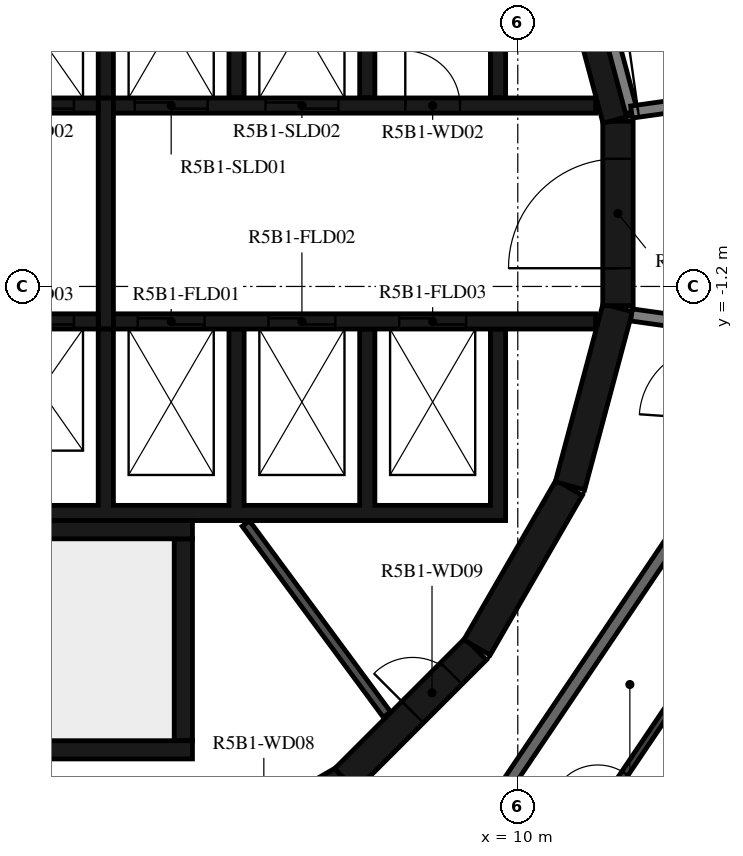
"""IFC4 building model, lengths in metres.
Left out: names, types, materials, properties, quantities, classifications, styles, units other than length and angle.
Written with IfcOpenShell. Run it as: python <this file> out.ifc"""

import sys

from ifc_helpers import new_model, si_unit, direction, frame, frame_2d, origin, place, context, subcontext, project, spatial, polyline, rectangle, outline, extrude, element, fill, save


model = new_model("IFC4")
c1 = context("Model", 3, precision=1e-05, world=origin(), true_north=direction((0.0, 1.0)))
c2 = subcontext(c1, "Body", "Model", "MODEL_VIEW")
j1 = project(units=[si_unit("LENGTHUNIT", "METRE"), si_unit("PLANEANGLEUNIT", "RADIAN")], contexts=[c1])
p1 = place(None, origin())
s1 = spatial("IfcSite", under=j1, at=p1, CompositionType="ELEMENT")
p2 = place(p1, origin())
s2 = spatial("IfcBuilding", under=s1, at=p2, CompositionType="ELEMENT")
p3 = place(p2, frame((0.0, 0.0, 198.9)))
s3 = spatial("IfcBuildingStorey", under=s2, at=p3, CompositionType="ELEMENT", Elevation=198.9)
p4 = place(p3, frame((4.51, -10.845, 0.0), z_axis=(0.0, 0.0, 1.0), x_axis=(0.865975092491, 0.500087131594, 0.0)))
e1 = element("IfcWall", 1, at=p4, inside=s3, PredefinedType="SHEAR", context=c2, shape_type="SweptSolid", body=[
    extrude(rectangle(XDim=3.033, YDim=0.5, at=frame_2d((1.516, 0.0))), origin(), (0.0, 0.0, 1.0), 3.12),
])
p5 = place(p4, frame((1.066, 0.0, 0.0)))
e2 = element("IfcOpeningElement", 2, at=p5, cuts=e1, PredefinedType="OPENING", context=c2, shape_type="SweptSolid", body=[
    extrude(rectangle(XDim=0.9, YDim=2.1, at=frame_2d((0.45, 1.05))), frame((0.0, 0.26, 0.0), z_axis=(0.0, -1.0, 0.0), x_axis=(1.0, 0.0, 0.0)), (0.0, 0.0, 1.0), 0.52),
])
p6 = place(p3, frame((7.164, -9.308, 0.0), z_axis=(0.0, 0.0, 1.0), x_axis=(0.707106781187, 0.707106781187, 0.0)))
e3 = element("IfcWall", 3, at=p6, inside=s3, PredefinedType="SHEAR", context=c2, shape_type="SweptSolid", body=[
    extrude(rectangle(XDim=3.032, YDim=0.5, at=frame_2d((1.516, 0.0))), origin(), (0.0, 0.0, 1.0), 3.12),
])
p7 = place(p6, frame((1.566, 0.0, 0.0)))
e4 = element("IfcOpeningElement", 4, at=p7, cuts=e3, PredefinedType="OPENING", context=c2, shape_type="SweptSolid", body=[
    extrude(rectangle(XDim=0.9, YDim=2.1, at=frame_2d((0.45, 1.05))), frame((0.0, 0.26, 0.0), z_axis=(0.0, -1.0, 0.0), x_axis=(1.0, 0.0, 0.0)), (0.0, 0.0, 1.0), 0.52),
])
for number, where, z_axis, x_axis in (
    (5, (9.329, -7.137, 0.0), (0.0, 0.0, 1.0), (0.5, 0.866, 0.0)),
    (6, (10.858, -4.479, 0.0), (0.0, 0.0, 1.0), (0.259, 0.966, 0.0)),
):
    element("IfcWall", number, at=place(p3, frame(where, z_axis=z_axis, x_axis=x_axis)), inside=s3, PredefinedType="SHEAR", context=c2, shape_type="SweptSolid", body=[
        extrude(rectangle(XDim=3.033, YDim=0.5, at=frame_2d((1.516, 0.0))), origin(), (0.0, 0.0, 1.0), 3.12),
    ])
p8 = place(p3, frame((11.647, -1.516, 0.0), z_axis=(0.0, 0.0, 1.0), x_axis=(0.0, 1.0, 0.0)))
e7 = element("IfcWall", 7, at=p8, inside=s3, PredefinedType="SHEAR", context=c2, shape_type="SweptSolid", body=[
    extrude(rectangle(XDim=3.033, YDim=0.5, at=frame_2d((1.516, 0.0))), origin(), (0.0, 0.0, 1.0), 3.12),
])
p9 = place(p8, frame((0.616, 0.0, 0.0)))
e8 = element("IfcOpeningElement", 8, at=p9, cuts=e7, PredefinedType="OPENING", context=c2, shape_type="SweptSolid", body=[
    extrude(rectangle(XDim=1.8, YDim=2.1, at=frame_2d((0.9, 1.05))), frame((0.0, 0.26, 0.0), z_axis=(0.0, -1.0, 0.0), x_axis=(1.0, 0.0, 0.0)), (0.0, 0.0, 1.0), 0.52),
])
p10 = place(p3, frame((11.643, 1.55, 0.0), z_axis=(0.0, 0.0, 1.0), x_axis=(-0.258734743916, 0.965948410781, 0.0)))
e9 = element("IfcWall", 9, at=p10, inside=s3, PredefinedType="SHEAR", context=c2, shape_type="SweptSolid", body=[
    extrude(rectangle(XDim=3.033, YDim=0.5, at=frame_2d((1.516, 0.0))), origin(), (0.0, 0.0, 1.0), 3.12),
])
p11 = place(p3, frame((-2.4, -5.2, 0.0), z_axis=(0.0, 0.0, 1.0), x_axis=(1.0, 0.0, 0.0)))
e10 = element("IfcWall", 10, at=p11, inside=s3, PredefinedType="SHEAR", context=c2, shape_type="SweptSolid", body=[
    extrude(rectangle(XDim=7.05, YDim=0.3, at=frame_2d((3.525, 0.0))), origin(), (0.0, 0.0, 1.0), 3.12),
])
p12 = place(p3, frame((4.5, -8.67, 0.0), z_axis=(0.0, 0.0, 1.0), x_axis=(0.0, 1.0, 0.0)))
e11 = element("IfcWall", 11, at=p12, inside=s3, PredefinedType="SHEAR", context=c2, shape_type="SweptSolid", body=[
    extrude(rectangle(XDim=3.32, YDim=0.3, at=frame_2d((1.66, 0.0))), origin(), (0.0, 0.0, 1.0), 3.12),
])
p13 = place(p3, frame((0.1, -8.82, 0.0), z_axis=(0.0, 0.0, 1.0), x_axis=(1.0, 0.0, 0.0)))
e12 = element("IfcWall", 12, at=p13, inside=s3, PredefinedType="SHEAR", context=c2, shape_type="SweptSolid", body=[
    extrude(rectangle(XDim=4.55, YDim=0.3, at=frame_2d((2.275, 0.0))), origin(), (0.0, 0.0, 1.0), 3.12),
])
p14 = place(p3, origin())
e13 = element("IfcWall", 13, at=p14, inside=s3, PredefinedType="SHEAR", context=c2, shape_type="SweptSolid", body=[
    extrude(outline(polyline([(-9.55, 4.8), (-1.2, 4.8), (-1.2, 1.9), (-0.95, 1.9), (-0.95, 4.8), (0.95, 4.8), (0.95, 1.9), (1.2, 1.9), (1.2, 4.8), (3.1, 4.8), (3.1, 1.9), (3.35, 1.9), (3.35, 4.8), (5.25, 4.8), (5.25, 1.9), (5.5, 1.9), (5.5, 4.8), (7.4, 4.8), (7.4, 1.9), (7.65, 1.9), (7.65, 4.8), (9.55, 4.8), (9.55, 1.9), (9.8, 1.9), (9.8, 4.8), (9.8, 5.05), (-9.8, 5.05), (-9.8, 4.8), (-9.8, 1.9), (-9.55, 1.9), (-9.55, 4.8)])), origin(), (0.0, 0.0, 1.0), 3.12),
])
p15 = place(p3, origin())
e14 = element("IfcWall", 14, at=p15, inside=s3, PredefinedType="SHEAR", context=c2, shape_type="SweptSolid", body=[
    extrude(outline(polyline([(9.8, -5.05), (9.8, -4.8), (9.8, -1.9), (9.55, -1.9), (9.55, -4.8), (7.65, -4.8), (7.65, -1.9), (7.4, -1.9), (7.4, -4.8), (5.5, -4.8), (5.5, -1.9), (5.25, -1.9), (5.25, -4.8), (3.35, -4.8), (3.35, -1.9), (3.1, -1.9), (3.1, -4.8), (1.2, -4.8), (1.2, -1.9), (0.95, -1.9), (0.95, -4.8), (-0.95, -4.8), (-0.95, -1.9), (-1.2, -1.9), (-1.2, -4.8), (-3.1, -4.8), (-3.1, -1.9), (-3.35, -1.9), (-3.35, -4.8), (-5.25, -4.8), (-5.25, -1.9), (-5.5, -1.9), (-5.5, -4.8), (-7.4, -4.8), (-7.4, -1.9), (-7.65, -1.9), (-7.65, -4.8), (-9.55, -4.8), (-9.55, -1.9), (-9.8, -1.9), (-9.8, -4.8), (-9.8, -5.05), (9.8, -5.05)])), origin(), (0.0, 0.0, 1.0), 3.12),
])
p16 = place(p3, frame((-11.28, 1.775, 0.0), z_axis=(0.0, 0.0, 1.0), x_axis=(1.0, 0.0, 0.0)))
e15 = element("IfcWall", 15, at=p16, inside=s3, PredefinedType="SHEAR", context=c2, shape_type="SweptSolid", body=[
    extrude(rectangle(XDim=14.38, YDim=0.25, at=frame_2d((7.19, 0.0))), origin(), (0.0, 0.0, 1.0), 3.12),
])
p17 = place(p16, frame((10.73, 0.0, 0.0)))
e16 = element("IfcOpeningElement", 16, at=p17, cuts=e15, PredefinedType="OPENING", context=c2, shape_type="SweptSolid", body=[
    extrude(rectangle(XDim=1.1, YDim=2.1, at=frame_2d((0.55, 1.05))), frame((0.0, 0.135, 0.0), z_axis=(0.0, -1.0, 0.0), x_axis=(1.0, 0.0, 0.0)), (0.0, 0.0, 1.0), 0.27),
])
p18 = place(p16, frame((12.88, 0.0, 0.0)))
e17 = element("IfcOpeningElement", 17, at=p18, cuts=e15, PredefinedType="OPENING", context=c2, shape_type="SweptSolid", body=[
    extrude(rectangle(XDim=1.1, YDim=2.1, at=frame_2d((0.55, 1.05))), frame((0.0, 0.135, 0.0), z_axis=(0.0, -1.0, 0.0), x_axis=(1.0, 0.0, 0.0)), (0.0, 0.0, 1.0), 0.27),
])
p19 = place(p16, frame((5.455, 0.0, 0.0)))
e18 = element("IfcOpeningElement", 18, at=p19, cuts=e15, PredefinedType="OPENING", context=c2, shape_type="SweptSolid", body=[
    extrude(rectangle(XDim=0.9, YDim=2.1, at=frame_2d((0.45, 1.05))), frame((0.0, 0.135, 0.0), z_axis=(0.0, -1.0, 0.0), x_axis=(1.0, 0.0, 0.0)), (0.0, 0.0, 1.0), 0.27),
])
p20 = place(p3, frame((3.35, 1.775, 0.0), z_axis=(0.0, 0.0, 1.0), x_axis=(1.0, 0.0, 0.0)))
e19 = element("IfcWall", 19, at=p20, inside=s3, PredefinedType="SHEAR", context=c2, shape_type="SweptSolid", body=[
    extrude(rectangle(XDim=7.93, YDim=0.25, at=frame_2d((3.965, 0.0))), origin(), (0.0, 0.0, 1.0), 3.12),
])
p21 = place(p20, frame((0.35, 0.0, 0.0)))
e20 = element("IfcOpeningElement", 20, at=p21, cuts=e19, PredefinedType="OPENING", context=c2, shape_type="SweptSolid", body=[
    extrude(rectangle(XDim=1.2, YDim=2.4, at=frame_2d((0.6, 1.2))), frame((0.0, 0.135, 0.0), z_axis=(0.0, -1.0, 0.0), x_axis=(1.0, 0.0, 0.0)), (0.0, 0.0, 1.0), 0.27),
])
p22 = place(p20, frame((2.5, 0.0, 0.0)))
e21 = element("IfcOpeningElement", 21, at=p22, cuts=e19, PredefinedType="OPENING", context=c2, shape_type="SweptSolid", body=[
    extrude(rectangle(XDim=1.2, YDim=2.4, at=frame_2d((0.6, 1.2))), frame((0.0, 0.135, 0.0), z_axis=(0.0, -1.0, 0.0), x_axis=(1.0, 0.0, 0.0)), (0.0, 0.0, 1.0), 0.27),
])
p23 = place(p20, frame((4.8, 0.0, 0.0)))
e22 = element("IfcOpeningElement", 22, at=p23, cuts=e19, PredefinedType="OPENING", context=c2, shape_type="SweptSolid", body=[
    extrude(rectangle(XDim=0.9, YDim=2.1, at=frame_2d((0.45, 1.05))), frame((0.0, 0.135, 0.0), z_axis=(0.0, -1.0, 0.0), x_axis=(1.0, 0.0, 0.0)), (0.0, 0.0, 1.0), 0.27),
])
p24 = place(p3, frame((-11.28, -1.775, 0.0), z_axis=(0.0, 0.0, 1.0), x_axis=(1.0, 0.0, 0.0)))
e23 = element("IfcWall", 23, at=p24, inside=s3, PredefinedType="SHEAR", context=c2, shape_type="SweptSolid", body=[
    extrude(rectangle(XDim=14.38, YDim=0.25, at=frame_2d((7.19, 0.0))), origin(), (0.0, 0.0, 1.0), 3.12),
])
p25 = place(p24, frame((12.88, 0.0, 0.0)))
e24 = element("IfcOpeningElement", 24, at=p25, cuts=e23, PredefinedType="OPENING", context=c2, shape_type="SweptSolid", body=[
    extrude(rectangle(XDim=1.1, YDim=2.1, at=frame_2d((0.55, 1.05))), frame((0.0, 0.135, 0.0), z_axis=(0.0, -1.0, 0.0), x_axis=(1.0, 0.0, 0.0)), (0.0, 0.0, 1.0), 0.27),
])
p26 = place(p24, frame((6.53, 0.0, 0.0)))
e25 = element("IfcOpeningElement", 25, at=p26, cuts=e23, PredefinedType="OPENING", context=c2, shape_type="SweptSolid", body=[
    extrude(rectangle(XDim=0.9, YDim=2.1, at=frame_2d((0.45, 1.05))), frame((0.0, 0.135, 0.0), z_axis=(0.0, -1.0, 0.0), x_axis=(1.0, 0.0, 0.0)), (0.0, 0.0, 1.0), 0.27),
])
p27 = place(p24, frame((8.68, 0.0, 0.0)))
e26 = element("IfcOpeningElement", 26, at=p27, cuts=e23, PredefinedType="OPENING", context=c2, shape_type="SweptSolid", body=[
    extrude(rectangle(XDim=0.9, YDim=2.1, at=frame_2d((0.45, 1.05))), frame((0.0, 0.135, 0.0), z_axis=(0.0, -1.0, 0.0), x_axis=(1.0, 0.0, 0.0)), (0.0, 0.0, 1.0), 0.27),
])
p28 = place(p24, frame((10.83, 0.0, 0.0)))
e27 = element("IfcOpeningElement", 27, at=p28, cuts=e23, PredefinedType="OPENING", context=c2, shape_type="SweptSolid", body=[
    extrude(rectangle(XDim=0.9, YDim=2.1, at=frame_2d((0.45, 1.05))), frame((0.0, 0.135, 0.0), z_axis=(0.0, -1.0, 0.0), x_axis=(1.0, 0.0, 0.0)), (0.0, 0.0, 1.0), 0.27),
])
p29 = place(p3, frame((3.35, -1.775, 0.0), z_axis=(0.0, 0.0, 1.0), x_axis=(1.0, 0.0, 0.0)))
e28 = element("IfcWall", 28, at=p29, inside=s3, PredefinedType="SHEAR", context=c2, shape_type="SweptSolid", body=[
    extrude(rectangle(XDim=7.93, YDim=0.25, at=frame_2d((3.965, 0.0))), origin(), (0.0, 0.0, 1.0), 3.12),
])
p30 = place(p29, frame((0.4, 0.0, 0.0)))
e29 = element("IfcOpeningElement", 29, at=p30, cuts=e28, PredefinedType="OPENING", context=c2, shape_type="SweptSolid", body=[
    extrude(rectangle(XDim=1.1, YDim=2.4, at=frame_2d((0.55, 1.2))), frame((0.0, 0.135, 0.0), z_axis=(0.0, -1.0, 0.0), x_axis=(1.0, 0.0, 0.0)), (0.0, 0.0, 1.0), 0.27),
])
p31 = place(p29, frame((2.55, 0.0, 0.0)))
e30 = element("IfcOpeningElement", 30, at=p31, cuts=e28, PredefinedType="OPENING", context=c2, shape_type="SweptSolid", body=[
    extrude(rectangle(XDim=1.1, YDim=2.4, at=frame_2d((0.55, 1.2))), frame((0.0, 0.135, 0.0), z_axis=(0.0, -1.0, 0.0), x_axis=(1.0, 0.0, 0.0)), (0.0, 0.0, 1.0), 0.27),
])
p32 = place(p29, frame((4.7, 0.0, 0.0)))
e31 = element("IfcOpeningElement", 31, at=p32, cuts=e28, PredefinedType="OPENING", context=c2, shape_type="SweptSolid", body=[
    extrude(rectangle(XDim=1.1, YDim=2.4, at=frame_2d((0.55, 1.2))), frame((0.0, 0.135, 0.0), z_axis=(0.0, -1.0, 0.0), x_axis=(1.0, 0.0, 0.0)), (0.0, 0.0, 1.0), 0.27),
])
p33 = place(p3, frame((3.225, -1.9, 0.0), z_axis=(0.0, 0.0, 1.0), x_axis=(0.0, 1.0, 0.0)))
e32 = element("IfcWall", 32, at=p33, inside=s3, PredefinedType="SHEAR", context=c2, shape_type="SweptSolid", body=[
    extrude(rectangle(XDim=3.8, YDim=0.25, at=frame_2d((1.9, 0.0))), origin(), (0.0, 0.0, 1.0), 3.12),
])
p34 = place(p3, frame((5.528, -5.098, 0.0), z_axis=(0.0, 0.0, 1.0), x_axis=(0.594034318069, -0.804439698769, 0.0)))
e33 = element("IfcWall", 33, at=p34, inside=s3, PredefinedType="PARTITIONING", context=c2, shape_type="SweptSolid", body=[
    extrude(rectangle(XDim=3.907, YDim=0.15, at=frame_2d((1.953, 0.0))), origin(), (0.0, 0.0, 1.0), 3.12),
])
p35 = place(p3, frame((11.87, 1.668, 0.0), z_axis=(0.0, 0.0, 1.0), x_axis=(-0.258836880648, 0.965921047093, 0.0)))
e34 = element("IfcWall", 34, at=p35, inside=s3, PredefinedType="STANDARD", context=c2, shape_type="SweptSolid", body=[
    extrude(rectangle(XDim=1.695, YDim=0.2, at=frame_2d((0.848, 0.0))), origin(), (0.0, 0.0, 1.0), 3.12),
])
p36 = place(p3, frame((11.87, 1.668, 0.0), z_axis=(0.0, 0.0, 1.0), x_axis=(0.990271931984, 0.139145609792, 0.0)))
e35 = element("IfcWall", 35, at=p36, inside=s3, PredefinedType="STANDARD", context=c2, shape_type="SweptSolid", body=[
    extrude(rectangle(XDim=1.712, YDim=0.2, at=frame_2d((0.856, 0.0))), origin(), (0.0, 0.0, 1.0), 3.12),
])
p37 = place(p36, frame((0.11, 0.0, 0.0)))
e36 = element("IfcOpeningElement", 36, at=p37, cuts=e35, PredefinedType="OPENING", context=c2, shape_type="SweptSolid", body=[
    extrude(rectangle(XDim=1.2, YDim=2.1, at=frame_2d((0.6, 1.05))), frame((0.0, 0.11, 0.0), z_axis=(0.0, -1.0, 0.0), x_axis=(1.0, 0.0, 0.0)), (0.0, 0.0, 1.0), 0.22),
])
p38 = place(p3, frame((13.618, 2.647, 0.0), z_axis=(0.0, 0.0, 1.0), x_axis=(-0.438366026218, 0.898796543751, 0.0)))
e37 = element("IfcWall", 37, at=p38, inside=s3, PredefinedType="STANDARD", context=c2, shape_type="SweptSolid", body=[
    extrude(rectangle(XDim=7.181, YDim=0.2, at=frame_2d((3.591, 0.0))), origin(), (0.0, 0.0, 1.0), 3.12),
])
p39 = place(p3, frame((13.302, -1.869, 0.0), z_axis=(0.0, 0.0, 1.0), x_axis=(-0.990274397042, 0.13912806533, 0.0)))
e38 = element("IfcWall", 38, at=p39, inside=s3, PredefinedType="STANDARD", context=c2, shape_type="SweptSolid", body=[
    extrude(rectangle(XDim=1.446, YDim=0.2, at=frame_2d((0.723, 0.0))), origin(), (0.0, 0.0, 1.0), 3.12),
])
p40 = place(p3, frame((9.101, -10.47, 0.0), z_axis=(0.0, 0.0, 1.0), x_axis=(0.559195469534, 0.829035841718, 0.0)))
e39 = element("IfcWall", 39, at=p40, inside=s3, PredefinedType="STANDARD", context=c2, shape_type="SweptSolid", body=[
    extrude(rectangle(XDim=7.181, YDim=0.2, at=frame_2d((3.591, 0.0))), origin(), (0.0, 0.0, 1.0), 3.12),
])
p41 = place(p3, frame((10.12, -11.642, 0.0), z_axis=(0.0, 0.0, 1.0), x_axis=(0.55920080659, 0.829032241779, 0.0)))
e40 = element("IfcWall", 40, at=p41, inside=s3, PredefinedType="PARTITIONING", context=c2, shape_type="SweptSolid", body=[
    extrude(rectangle(XDim=7.985, YDim=0.12, at=frame_2d((3.992, 0.0))), origin(), (0.0, 0.0, 1.0), 3.12),
])
p42 = place(p41, frame((2.138, 0.0, 0.0)))
e41 = element("IfcOpeningElement", 41, at=p42, cuts=e40, PredefinedType="OPENING", context=c2, shape_type="SweptSolid", body=[
    extrude(rectangle(XDim=0.8, YDim=2.1, at=frame_2d((0.4, 1.05))), frame((0.0, 0.07, 0.0), z_axis=(0.0, -1.0, 0.0), x_axis=(1.0, 0.0, 0.0)), (0.0, 0.0, 1.0), 0.14),
])
p43 = place(p3, frame((22.052, -5.467, 0.0), z_axis=(0.0, 0.0, 1.0), x_axis=(-0.898796865831, -0.438365365846, 0.0)))
e42 = element("IfcWall", 42, at=p43, inside=s3, PredefinedType="PARTITIONING", context=c2, shape_type="SweptSolid", body=[
    extrude(rectangle(XDim=12.879, YDim=0.12, at=frame_2d((6.439, 0.0))), origin(), (0.0, 0.0, 1.0), 3.12),
])
p44 = place(p9, origin())
e43 = element("IfcDoor", 43, at=p44, inside=s3, OperationType="DOUBLE_DOOR_SINGLE_SWING", PredefinedType="DOOR", context=c2, shape_type="SweptSolid", body=[
    extrude(rectangle(XDim=1.8, YDim=2.1, at=frame_2d((0.9, 1.05))), frame((0.0, 0.025, 0.0), z_axis=(0.0, -1.0, 0.0), x_axis=(1.0, 0.0, 0.0)), (0.0, 0.0, 1.0), 0.05),
])
fill(e8, e43)
p45 = place(p18, origin())
e44 = element("IfcDoor", 44, at=p45, inside=s3, OperationType="DOUBLE_DOOR_SLIDING", PredefinedType="DOOR", context=c2, shape_type="SweptSolid", body=[
    extrude(rectangle(XDim=1.1, YDim=2.1, at=frame_2d((0.55, 1.05))), frame((0.0, 0.025, 0.0), z_axis=(0.0, -1.0, 0.0), x_axis=(1.0, 0.0, 0.0)), (0.0, 0.0, 1.0), 0.05),
])
fill(e17, e44)
p46 = place(p21, origin())
e45 = element("IfcDoor", 45, at=p46, inside=s3, OperationType="DOUBLE_DOOR_SLIDING", PredefinedType="DOOR", context=c2, shape_type="SweptSolid", body=[
    extrude(rectangle(XDim=1.2, YDim=2.4, at=frame_2d((0.6, 1.2))), frame((0.0, 0.025, 0.0), z_axis=(0.0, -1.0, 0.0), x_axis=(1.0, 0.0, 0.0)), (0.0, 0.0, 1.0), 0.05),
])
fill(e20, e45)
p47 = place(p22, origin())
e46 = element("IfcDoor", 46, at=p47, inside=s3, OperationType="DOUBLE_DOOR_SLIDING", PredefinedType="DOOR", context=c2, shape_type="SweptSolid", body=[
    extrude(rectangle(XDim=1.2, YDim=2.4, at=frame_2d((0.6, 1.2))), frame((0.0, 0.025, 0.0), z_axis=(0.0, -1.0, 0.0), x_axis=(1.0, 0.0, 0.0)), (0.0, 0.0, 1.0), 0.05),
])
fill(e21, e46)
p48 = place(p25, origin())
e47 = element("IfcDoor", 47, at=p48, inside=s3, OperationType="DOUBLE_DOOR_SLIDING", PredefinedType="DOOR", context=c2, shape_type="SweptSolid", body=[
    extrude(rectangle(XDim=1.1, YDim=2.1, at=frame_2d((0.55, 1.05))), frame((0.0, 0.025, 0.0), z_axis=(0.0, -1.0, 0.0), x_axis=(1.0, 0.0, 0.0)), (0.0, 0.0, 1.0), 0.05),
])
fill(e24, e47)
p49 = place(p30, origin())
e48 = element("IfcDoor", 48, at=p49, inside=s3, OperationType="DOUBLE_DOOR_SLIDING", PredefinedType="DOOR", context=c2, shape_type="SweptSolid", body=[
    extrude(rectangle(XDim=1.1, YDim=2.4, at=frame_2d((0.55, 1.2))), frame((0.0, 0.025, 0.0), z_axis=(0.0, -1.0, 0.0), x_axis=(1.0, 0.0, 0.0)), (0.0, 0.0, 1.0), 0.05),
])
fill(e29, e48)
p50 = place(p31, origin())
e49 = element("IfcDoor", 49, at=p50, inside=s3, OperationType="DOUBLE_DOOR_SLIDING", PredefinedType="DOOR", context=c2, shape_type="SweptSolid", body=[
    extrude(rectangle(XDim=1.1, YDim=2.4, at=frame_2d((0.55, 1.2))), frame((0.0, 0.025, 0.0), z_axis=(0.0, -1.0, 0.0), x_axis=(1.0, 0.0, 0.0)), (0.0, 0.0, 1.0), 0.05),
])
fill(e30, e49)
p51 = place(p32, origin())
e50 = element("IfcDoor", 50, at=p51, inside=s3, OperationType="DOUBLE_DOOR_SLIDING", PredefinedType="DOOR", context=c2, shape_type="SweptSolid", body=[
    extrude(rectangle(XDim=1.1, YDim=2.4, at=frame_2d((0.55, 1.2))), frame((0.0, 0.025, 0.0), z_axis=(0.0, -1.0, 0.0), x_axis=(1.0, 0.0, 0.0)), (0.0, 0.0, 1.0), 0.05),
])
fill(e31, e50)
p52 = place(p23, origin())
e51 = element("IfcDoor", 51, at=p52, inside=s3, OperationType="SINGLE_SWING_RIGHT", PredefinedType="DOOR", context=c2, shape_type="SweptSolid", body=[
    extrude(rectangle(XDim=0.9, YDim=2.1, at=frame_2d((0.45, 1.05))), frame((0.0, 0.025, 0.0), z_axis=(0.0, -1.0, 0.0), x_axis=(1.0, 0.0, 0.0)), (0.0, 0.0, 1.0), 0.05),
])
fill(e22, e51)
p53 = place(p7, origin())
e52 = element("IfcDoor", 52, at=p53, inside=s3, OperationType="SINGLE_SWING_LEFT", PredefinedType="DOOR", context=c2, shape_type="SweptSolid", body=[
    extrude(rectangle(XDim=0.9, YDim=2.1, at=frame_2d((0.45, 1.05))), frame((0.0, 0.025, 0.0), z_axis=(0.0, -1.0, 0.0), x_axis=(1.0, 0.0, 0.0)), (0.0, 0.0, 1.0), 0.05),
])
fill(e4, e52)
p54 = place(p42, origin())
e53 = element("IfcDoor", 53, at=p54, inside=s3, OperationType="SINGLE_SWING_RIGHT", PredefinedType="DOOR", context=c2, shape_type="SweptSolid", body=[
    extrude(rectangle(XDim=0.8, YDim=2.1, at=frame_2d((0.4, 1.05))), frame((0.0, 0.025, 0.0), z_axis=(0.0, -1.0, 0.0), x_axis=(1.0, 0.0, 0.0)), (0.0, 0.0, 1.0), 0.05),
])
fill(e41, e53)
p55 = place(p37, origin())
e54 = element("IfcDoor", 54, at=p55, inside=s3, OperationType="DOUBLE_DOOR_SINGLE_SWING", PredefinedType="DOOR", context=c2, shape_type="SweptSolid", body=[
    extrude(rectangle(XDim=1.2, YDim=2.1, at=frame_2d((0.6, 1.05))), frame((0.0, 0.025, 0.0), z_axis=(0.0, -1.0, 0.0), x_axis=(1.0, 0.0, 0.0)), (0.0, 0.0, 1.0), 0.05),
])
fill(e36, e54)
save(model, sys.argv[1])
